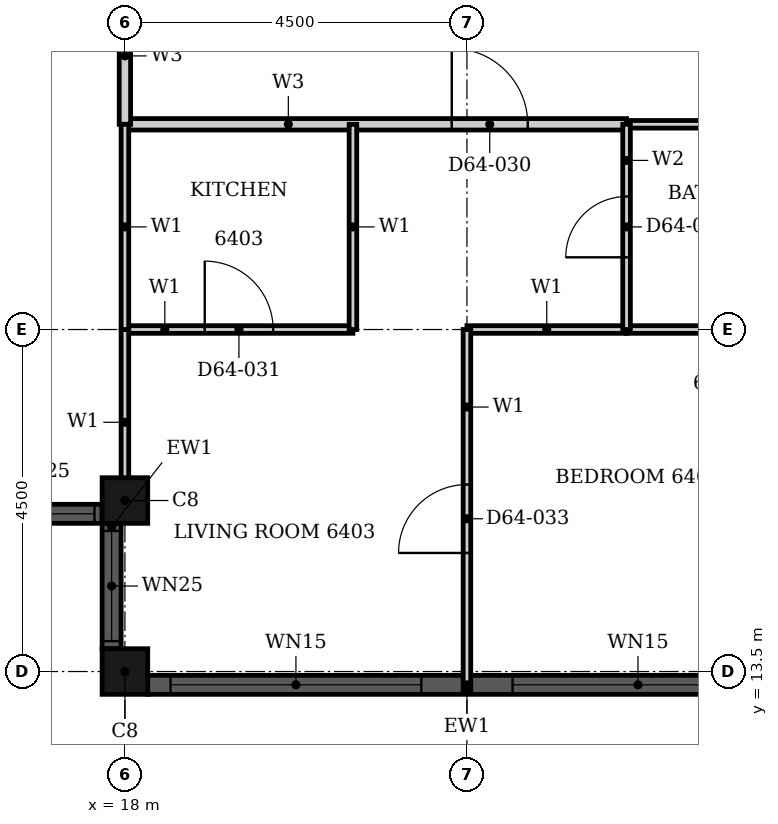
"""IFC4 building model, lengths in metres.
Left out: names, types, materials, properties, quantities, classifications, styles, units other than length and angle.
Written with IfcOpenShell. Run it as: python <this file> out.ifc"""

import sys

from ifc_helpers import new_model, si_unit, direction, frame, frame_2d, origin, origin_2d, place, context, subcontext, project, spatial, rectangle, hollow_rectangle, extrude, element, fill, save


model = new_model("IFC4")
c1 = context("Model", 3, precision=1e-05, world=origin(), true_north=direction((0.0, 1.0)))
c2 = subcontext(c1, "Body", "Model", "MODEL_VIEW")
j1 = project(units=[si_unit("LENGTHUNIT", "METRE"), si_unit("PLANEANGLEUNIT", "RADIAN")], contexts=[c1])
p1 = place(None, origin())
s1 = spatial("IfcSite", under=j1, at=p1, CompositionType="ELEMENT")
p2 = place(p1, origin())
s2 = spatial("IfcBuilding", under=s1, at=p2, CompositionType="ELEMENT")
p3 = place(p2, frame((0.0, 0.0, 252.7)))
s3 = spatial("IfcBuildingStorey", under=s2, at=p3, CompositionType="ELEMENT", Elevation=252.7)
for number, where, z_axis, x_axis in (
    (1, (18.0, 15.75, 0.0), (0.0, 0.0, 1.0), (1.0, 0.0, 0.0)),
    (2, (18.0, 13.5, 0.0), (0.0, 0.0, 1.0), (1.0, 0.0, 0.0)),
):
    element("IfcColumn", number, at=place(p3, frame(where, z_axis=z_axis, x_axis=x_axis)), inside=s3, PredefinedType="COLUMN", context=c2, shape_type="SweptSolid", body=[
        extrude(hollow_rectangle(XDim=0.6, YDim=0.6, WallThickness=0.02, at=origin_2d()), origin(), (0.0, 0.0, 1.0), 3.7),
    ])
p4 = place(p3, frame((16.05, 15.575, 0.0), z_axis=(0.0, 0.0, 1.0), x_axis=(1.0, 0.0, 0.0)))
e3 = element("IfcWall", 3, at=p4, inside=s3, PredefinedType="SOLIDWALL", context=c2, shape_type="SweptSolid", body=[
    extrude(rectangle(XDim=1.65, YDim=0.25, at=frame_2d((0.825, 0.0))), origin(), (0.0, 0.0, 1.0), 3.7),
])
p5 = place(p4, frame((0.1, 0.0, 0.9)))
e4 = element("IfcOpeningElement", 4, at=p5, cuts=e3, PredefinedType="OPENING", context=c2, shape_type="SweptSolid", body=[
    extrude(rectangle(XDim=1.45, YDim=1.85, at=frame_2d((0.725, 0.925))), frame((0.0, 0.135, 0.0), z_axis=(0.0, -1.0, 0.0), x_axis=(1.0, 0.0, 0.0)), (0.0, 0.0, 1.0), 0.27),
])
p6 = place(p3, frame((17.825, 15.45, 0.0), z_axis=(0.0, 0.0, 1.0), x_axis=(0.0, -1.0, 0.0)))
e5 = element("IfcWall", 5, at=p6, inside=s3, PredefinedType="SOLIDWALL", context=c2, shape_type="SweptSolid", body=[
    extrude(rectangle(XDim=1.65, YDim=0.25, at=frame_2d((0.825, 0.0))), origin(), (0.0, 0.0, 1.0), 3.7),
])
p7 = place(p6, frame((0.1, 0.0, 0.9)))
e6 = element("IfcOpeningElement", 6, at=p7, cuts=e5, PredefinedType="OPENING", context=c2, shape_type="SweptSolid", body=[
    extrude(rectangle(XDim=1.45, YDim=1.85, at=frame_2d((0.725, 0.925))), frame((0.0, 0.135, 0.0), z_axis=(0.0, -1.0, 0.0), x_axis=(1.0, 0.0, 0.0)), (0.0, 0.0, 1.0), 0.27),
])
p8 = place(p3, frame((18.3, 13.325, 0.0), z_axis=(0.0, 0.0, 1.0), x_axis=(1.0, 0.0, 0.0)))
e7 = element("IfcWall", 7, at=p8, inside=s3, PredefinedType="SOLIDWALL", context=c2, shape_type="SweptSolid", body=[
    extrude(rectangle(XDim=8.4, YDim=0.25, at=frame_2d((4.2, 0.0))), origin(), (0.0, 0.0, 1.0), 3.7),
])
p9 = place(p8, frame((0.3, 0.0, 0.45)))
e8 = element("IfcOpeningElement", 8, at=p9, cuts=e7, PredefinedType="OPENING", context=c2, shape_type="SweptSolid", body=[
    extrude(rectangle(XDim=3.3, YDim=2.3, at=frame_2d((1.65, 1.15))), frame((0.0, 0.135, 0.0), z_axis=(0.0, -1.0, 0.0), x_axis=(1.0, 0.0, 0.0)), (0.0, 0.0, 1.0), 0.27),
])
p10 = place(p8, frame((4.8, 0.0, 0.45)))
e9 = element("IfcOpeningElement", 9, at=p10, cuts=e7, PredefinedType="OPENING", context=c2, shape_type="SweptSolid", body=[
    extrude(rectangle(XDim=3.3, YDim=2.3, at=frame_2d((1.65, 1.15))), frame((0.0, 0.135, 0.0), z_axis=(0.0, -1.0, 0.0), x_axis=(1.0, 0.0, 0.0)), (0.0, 0.0, 1.0), 0.27),
])
p11 = place(p3, frame((18.0, 20.7, 0.0), z_axis=(0.0, 0.0, 1.0), x_axis=(1.0, 0.0, 0.0)))
e10 = element("IfcWall", 10, at=p11, inside=s3, PredefinedType="PARTITIONING", context=c2, shape_type="SweptSolid", body=[
    extrude(rectangle(XDim=6.6, YDim=0.15, at=frame_2d((3.3, 0.0))), origin(), (0.0, 0.0, 1.0), 3.4),
])
p12 = place(p11, frame((4.3, 0.0, 0.0)))
e11 = element("IfcOpeningElement", 11, at=p12, cuts=e10, PredefinedType="OPENING", context=c2, shape_type="SweptSolid", body=[
    extrude(rectangle(XDim=1.0, YDim=2.2, at=frame_2d((0.5, 1.1))), frame((0.0, 0.085, 0.0), z_axis=(0.0, -1.0, 0.0), x_axis=(1.0, 0.0, 0.0)), (0.0, 0.0, 1.0), 0.17),
])
p13 = place(p3, frame((18.0, 20.7, 0.0), z_axis=(0.0, 0.0, 1.0), x_axis=(0.0, 1.0, 0.0)))
e12 = element("IfcWall", 12, at=p13, inside=s3, PredefinedType="PARTITIONING", context=c2, shape_type="SweptSolid", body=[
    extrude(rectangle(XDim=1.8, YDim=0.15, at=frame_2d((0.9, 0.0))), origin(), (0.0, 0.0, 1.0), 3.4),
])
p14 = place(p3, frame((22.5, 18.0, 0.0), z_axis=(0.0, 0.0, 1.0), x_axis=(1.0, 0.0, 0.0)))
e13 = element("IfcWall", 13, at=p14, inside=s3, PredefinedType="PARTITIONING", context=c2, shape_type="SweptSolid", body=[
    extrude(rectangle(XDim=2.1, YDim=0.1, at=frame_2d((1.05, 0.0))), origin(), (0.0, 0.0, 1.0), 3.4),
])
p15 = place(p3, frame((18.0, 18.0, 0.0), z_axis=(0.0, 0.0, 1.0), x_axis=(1.0, 0.0, 0.0)))
e14 = element("IfcWall", 14, at=p15, inside=s3, PredefinedType="PARTITIONING", context=c2, shape_type="SweptSolid", body=[
    extrude(rectangle(XDim=3.0, YDim=0.1, at=frame_2d((1.5, 0.0))), origin(), (0.0, 0.0, 1.0), 3.4),
])
p16 = place(p15, frame((1.05, 0.0, 0.0)))
e15 = element("IfcOpeningElement", 15, at=p16, cuts=e14, PredefinedType="OPENING", context=c2, shape_type="SweptSolid", body=[
    extrude(rectangle(XDim=0.9, YDim=2.1, at=frame_2d((0.45, 1.05))), frame((0.0, 0.06, 0.0), z_axis=(0.0, -1.0, 0.0), x_axis=(1.0, 0.0, 0.0)), (0.0, 0.0, 1.0), 0.12),
])
p17 = place(p3, frame((18.0, 15.56, 0.0), z_axis=(0.0, 0.0, 1.0), x_axis=(0.0, 1.0, 0.0)))
e16 = element("IfcWall", 16, at=p17, inside=s3, PredefinedType="PARTITIONING", context=c2, shape_type="SweptSolid", body=[
    extrude(rectangle(XDim=2.439, YDim=0.1, at=frame_2d((1.219, 0.0))), origin(), (0.0, 0.0, 1.0), 3.4),
])
for number, where, z_axis, x_axis in (
    (17, (18.0, 18.0, 0.0), (0.0, 0.0, 1.0), (0.0, 1.0, 0.0)),
    (18, (21.0, 18.0, 0.0), (0.0, 0.0, 1.0), (0.0, 1.0, 0.0)),
):
    element("IfcWall", number, at=place(p3, frame(where, z_axis=z_axis, x_axis=x_axis)), inside=s3, PredefinedType="PARTITIONING", context=c2, shape_type="SweptSolid", body=[
        extrude(rectangle(XDim=2.7, YDim=0.1, at=frame_2d((1.35, 0.0))), origin(), (0.0, 0.0, 1.0), 3.4),
    ])
p18 = place(p3, frame((22.5, 13.26, 0.0), z_axis=(0.0, 0.0, 1.0), x_axis=(0.0, 1.0, 0.0)))
e19 = element("IfcWall", 19, at=p18, inside=s3, PredefinedType="PARTITIONING", context=c2, shape_type="SweptSolid", body=[
    extrude(rectangle(XDim=4.74, YDim=0.1, at=frame_2d((2.37, 0.0))), origin(), (0.0, 0.0, 1.0), 3.4),
])
p19 = place(p18, frame((1.8, 0.0, 0.0)))
e20 = element("IfcOpeningElement", 20, at=p19, cuts=e19, PredefinedType="OPENING", context=c2, shape_type="SweptSolid", body=[
    extrude(rectangle(XDim=0.9, YDim=2.1, at=frame_2d((0.45, 1.05))), frame((0.0, 0.06, 0.0), z_axis=(0.0, -1.0, 0.0), x_axis=(1.0, 0.0, 0.0)), (0.0, 0.0, 1.0), 0.12),
])
for number, where, z_axis, x_axis in (
    (21, (24.6, 18.0, 0.0), (0.0, 0.0, 1.0), (1.0, 0.0, 0.0)),
    (22, (24.6, 20.7, 0.0), (0.0, 0.0, 1.0), (1.0, 0.0, 0.0)),
):
    element("IfcWall", number, at=place(p3, frame(where, z_axis=z_axis, x_axis=x_axis)), inside=s3, PredefinedType="PARTITIONING", context=c2, shape_type="SweptSolid", body=[
        extrude(rectangle(XDim=2.4, YDim=0.1, at=frame_2d((1.2, 0.0))), origin(), (0.0, 0.0, 1.0), 3.4),
    ])
p20 = place(p3, frame((24.6, 18.0, 0.0), z_axis=(0.0, 0.0, 1.0), x_axis=(0.0, 1.0, 0.0)))
e23 = element("IfcWall", 23, at=p20, inside=s3, PredefinedType="PARTITIONING", context=c2, shape_type="SweptSolid", body=[
    extrude(rectangle(XDim=2.7, YDim=0.1, at=frame_2d((1.35, 0.0))), origin(), (0.0, 0.0, 1.0), 3.4),
])
p21 = place(p20, frame((0.95, 0.0, 0.0)))
e24 = element("IfcOpeningElement", 24, at=p21, cuts=e23, PredefinedType="OPENING", context=c2, shape_type="SweptSolid", body=[
    extrude(rectangle(XDim=0.8, YDim=2.1, at=frame_2d((0.4, 1.05))), frame((0.0, 0.06, 0.0), z_axis=(0.0, -1.0, 0.0), x_axis=(1.0, 0.0, 0.0)), (0.0, 0.0, 1.0), 0.12),
])
p22 = place(p5, origin())
e25 = element("IfcWindow", 25, at=p22, inside=s3, PartitioningType="SINGLE_PANEL", PredefinedType="WINDOW", context=c2, shape_type="SweptSolid", body=[
    extrude(rectangle(XDim=1.45, YDim=1.85, at=frame_2d((0.725, 0.925))), frame((0.0, 0.03, 0.0), z_axis=(0.0, -1.0, 0.0), x_axis=(1.0, 0.0, 0.0)), (0.0, 0.0, 1.0), 0.06),
])
fill(e4, e25)
p23 = place(p7, origin())
e26 = element("IfcWindow", 26, at=p23, inside=s3, PartitioningType="SINGLE_PANEL", PredefinedType="WINDOW", context=c2, shape_type="SweptSolid", body=[
    extrude(rectangle(XDim=1.45, YDim=1.85, at=frame_2d((0.725, 0.925))), frame((0.0, 0.03, 0.0), z_axis=(0.0, -1.0, 0.0), x_axis=(1.0, 0.0, 0.0)), (0.0, 0.0, 1.0), 0.06),
])
fill(e6, e26)
p24 = place(p9, origin())
e27 = element("IfcWindow", 27, at=p24, inside=s3, PartitioningType="SINGLE_PANEL", PredefinedType="WINDOW", context=c2, shape_type="SweptSolid", body=[
    extrude(rectangle(XDim=3.3, YDim=2.3, at=frame_2d((1.65, 1.15))), frame((0.0, 0.03, 0.0), z_axis=(0.0, -1.0, 0.0), x_axis=(1.0, 0.0, 0.0)), (0.0, 0.0, 1.0), 0.06),
])
fill(e8, e27)
p25 = place(p10, origin())
e28 = element("IfcWindow", 28, at=p25, inside=s3, PartitioningType="SINGLE_PANEL", PredefinedType="WINDOW", context=c2, shape_type="SweptSolid", body=[
    extrude(rectangle(XDim=3.3, YDim=2.3, at=frame_2d((1.65, 1.15))), frame((0.0, 0.03, 0.0), z_axis=(0.0, -1.0, 0.0), x_axis=(1.0, 0.0, 0.0)), (0.0, 0.0, 1.0), 0.06),
])
fill(e9, e28)
p26 = place(p12, origin())
e29 = element("IfcDoor", 29, at=p26, inside=s3, OperationType="SINGLE_SWING_RIGHT", PredefinedType="DOOR", context=c2, shape_type="SweptSolid", body=[
    extrude(rectangle(XDim=1.0, YDim=2.2, at=frame_2d((0.5, 1.1))), frame((0.0, 0.025, 0.0), z_axis=(0.0, -1.0, 0.0), x_axis=(1.0, 0.0, 0.0)), (0.0, 0.0, 1.0), 0.05),
])
fill(e11, e29)
p27 = place(p16, origin())
e30 = element("IfcDoor", 30, at=p27, inside=s3, OperationType="SINGLE_SWING_LEFT", PredefinedType="DOOR", context=c2, shape_type="SweptSolid", body=[
    extrude(rectangle(XDim=0.9, YDim=2.1, at=frame_2d((0.45, 1.05))), frame((0.0, 0.025, 0.0), z_axis=(0.0, -1.0, 0.0), x_axis=(1.0, 0.0, 0.0)), (0.0, 0.0, 1.0), 0.05),
])
fill(e15, e30)
p28 = place(p21, origin())
e31 = element("IfcDoor", 31, at=p28, inside=s3, OperationType="SINGLE_SWING_LEFT", PredefinedType="DOOR", context=c2, shape_type="SweptSolid", body=[
    extrude(rectangle(XDim=0.8, YDim=2.1, at=frame_2d((0.4, 1.05))), frame((0.0, 0.025, 0.0), z_axis=(0.0, -1.0, 0.0), x_axis=(1.0, 0.0, 0.0)), (0.0, 0.0, 1.0), 0.05),
])
fill(e24, e31)
p29 = place(p19, origin())
e32 = element("IfcDoor", 32, at=p29, inside=s3, OperationType="SINGLE_SWING_LEFT", PredefinedType="DOOR", context=c2, shape_type="SweptSolid", body=[
    extrude(rectangle(XDim=0.9, YDim=2.1, at=frame_2d((0.45, 1.05))), frame((0.0, 0.025, 0.0), z_axis=(0.0, -1.0, 0.0), x_axis=(1.0, 0.0, 0.0)), (0.0, 0.0, 1.0), 0.05),
])
fill(e20, e32)
save(model, sys.argv[1])
